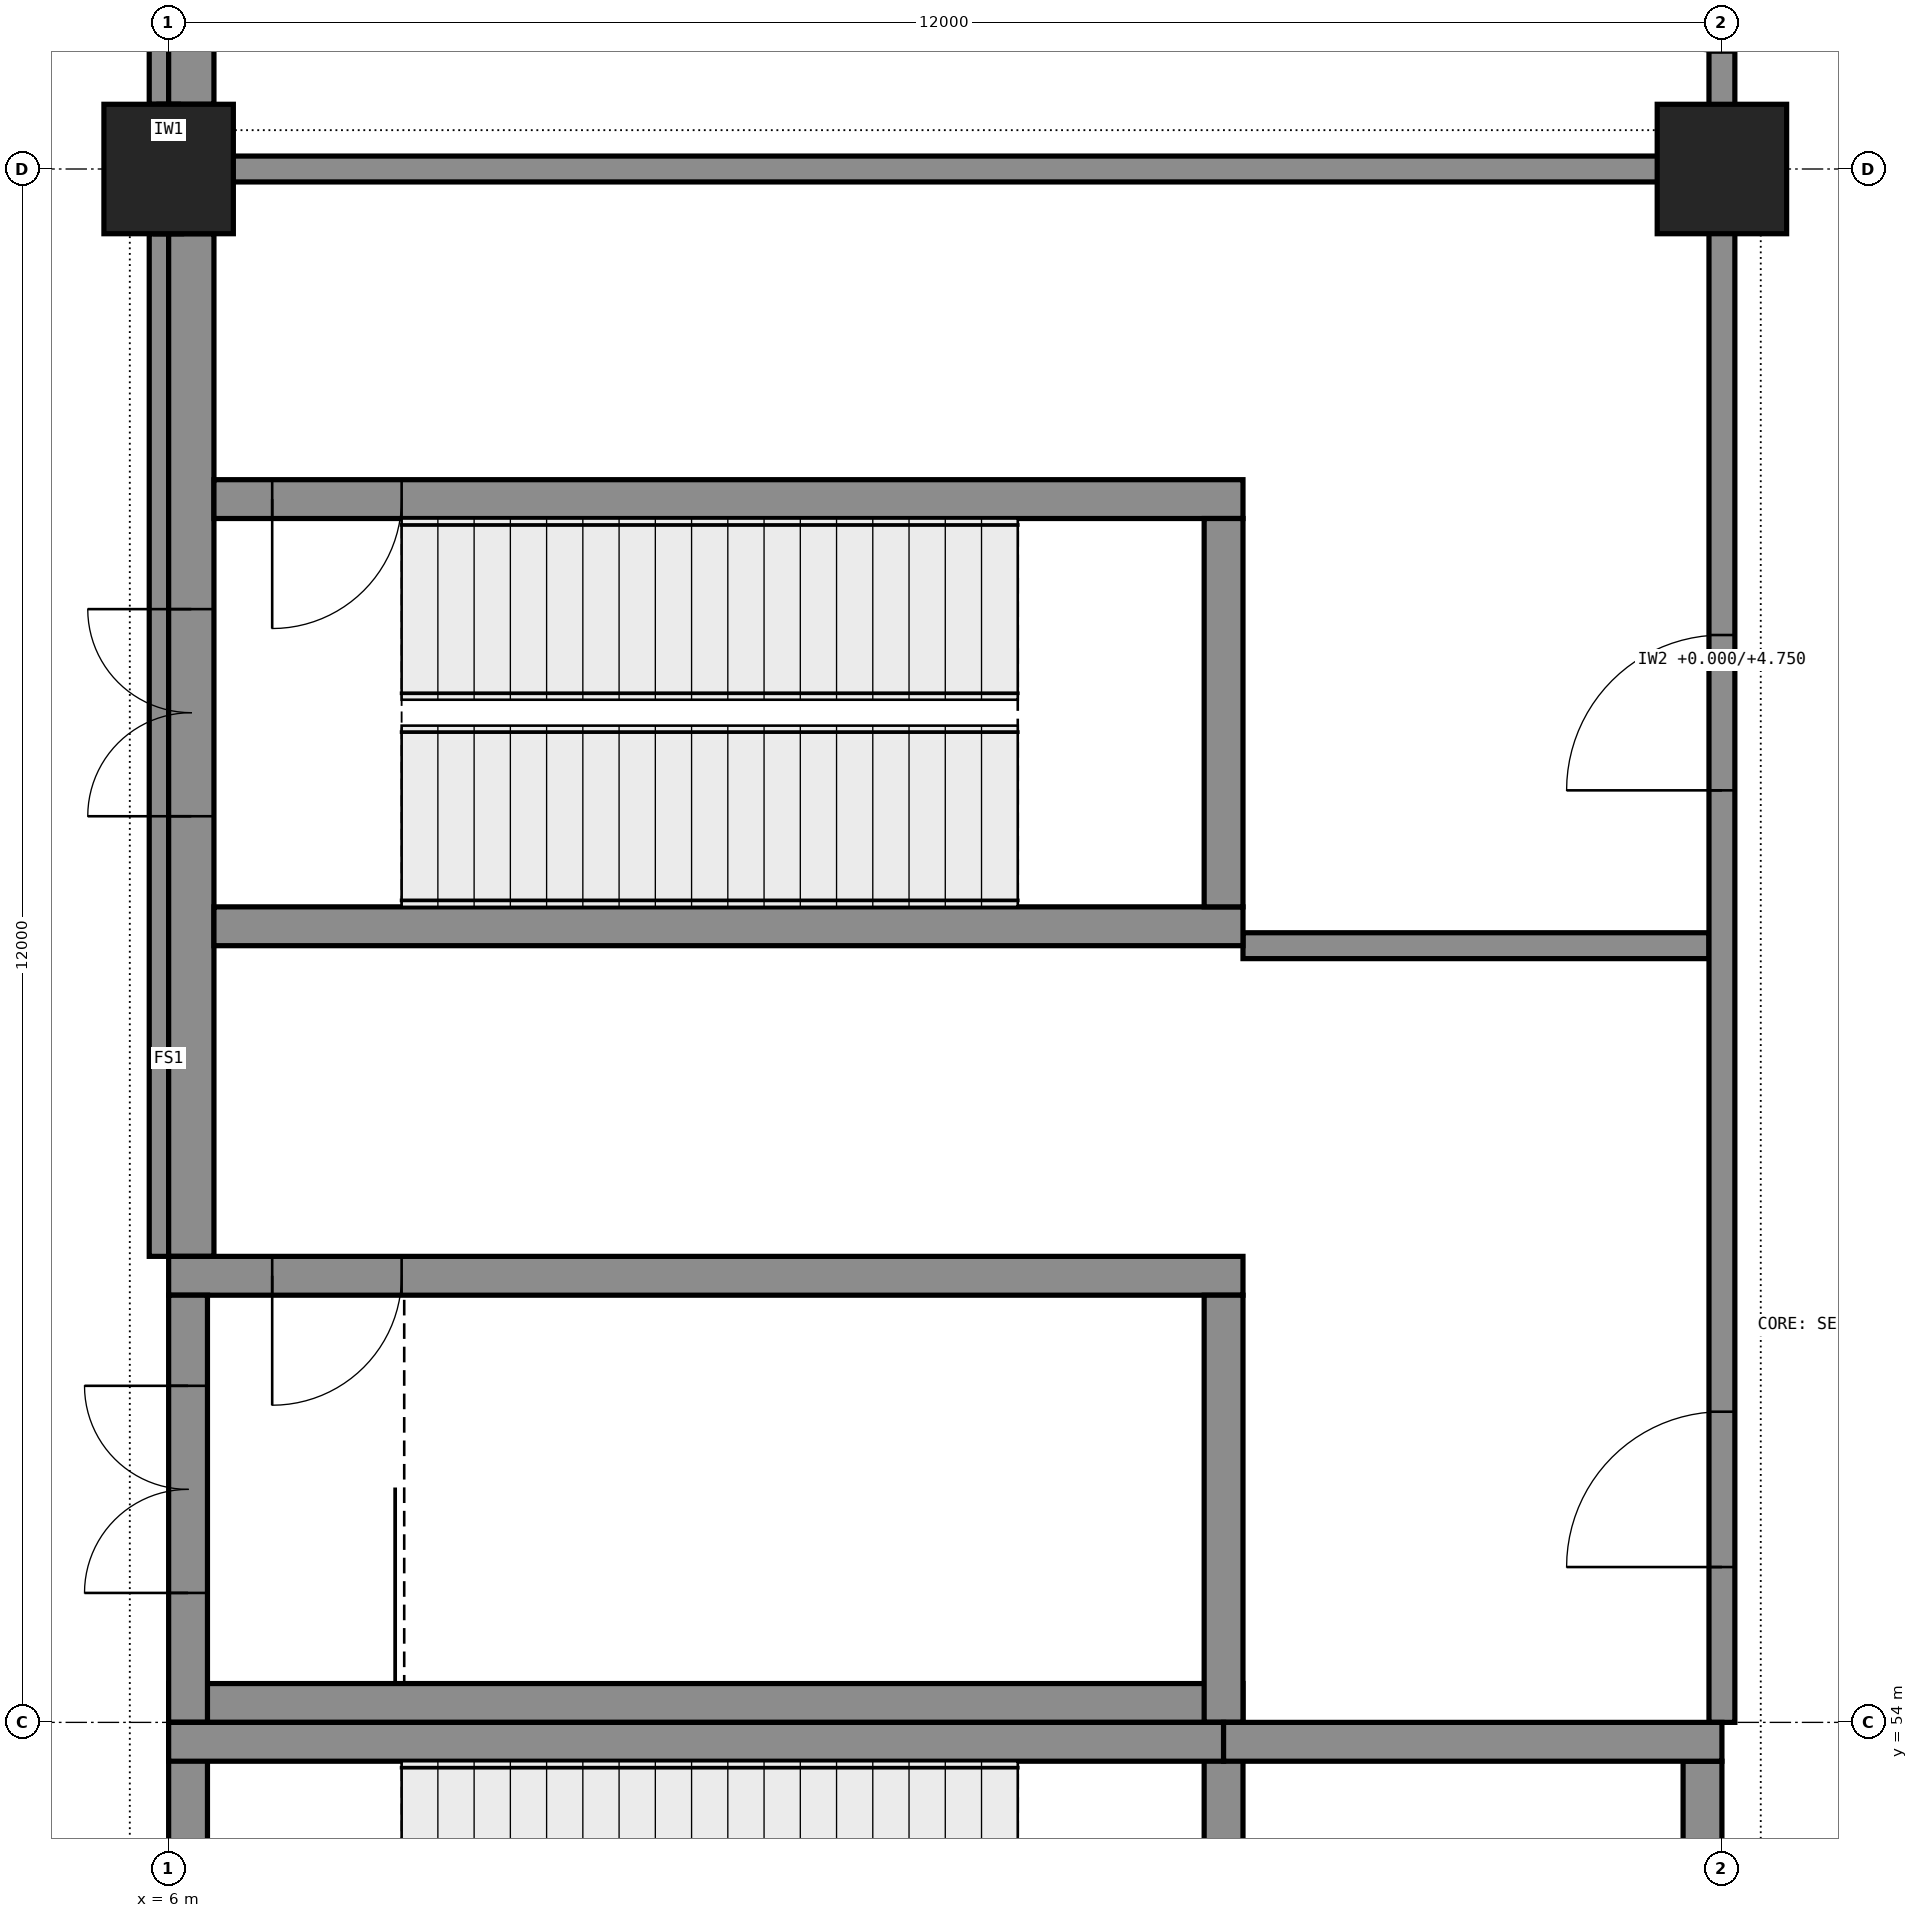
"""IFC4 building model, lengths in metres.
Left out: names, types, materials, properties, quantities, classifications, styles, units other than length and angle.
Written with IfcOpenShell. Run it as: python <this file> out.ifc"""

import sys

from ifc_helpers import new_model, si_unit, direction, frame, frame_2d, origin, origin_2d, place, context, subcontext, project, spatial, rectangle, extrude, element, fill, save


model = new_model("IFC4")
c1 = context("Model", 3, precision=1e-05, world=origin(), true_north=direction((0.0, 1.0)))
c2 = subcontext(c1, "Body", "Model", "MODEL_VIEW")
j1 = project(units=[si_unit("LENGTHUNIT", "METRE"), si_unit("PLANEANGLEUNIT", "RADIAN")], contexts=[c1])
p1 = place(None, origin())
s1 = spatial("IfcSite", under=j1, at=p1, CompositionType="ELEMENT")
p2 = place(p1, origin())
s2 = spatial("IfcBuilding", under=s1, at=p2, CompositionType="ELEMENT")
p3 = place(p2, origin())
s3 = spatial("IfcBuildingStorey", under=s2, at=p3, CompositionType="ELEMENT", Elevation=0.0)
for number, where, z_axis, x_axis in (
    (1, (6.0, 66.0, 0.0), (0.0, 0.0, 1.0), (1.0, 0.0, 0.0)),
    (2, (18.0, 66.0, 0.0), (0.0, 0.0, 1.0), (1.0, 0.0, 0.0)),
):
    element("IfcColumn", number, at=place(p3, frame(where, z_axis=z_axis, x_axis=x_axis)), inside=s3, PredefinedType="COLUMN", context=c2, shape_type="SweptSolid", body=[
        extrude(rectangle(XDim=1.0, YDim=1.0, at=origin_2d()), origin(), (0.0, 0.0, 1.0), 6.0),
    ])
p4 = place(p3, frame((6.0, 54.15, 0.0), z_axis=(0.0, 0.0, 1.0), x_axis=(1.0, 0.0, 0.0)))
e3 = element("IfcWall", 3, at=p4, inside=s3, PredefinedType="SHEAR", context=c2, shape_type="SweptSolid", body=[
    extrude(rectangle(XDim=8.3, YDim=0.3, at=frame_2d((4.15, 0.0))), origin(), (0.0, 0.0, 1.0), 5.75),
])
p5 = place(p3, frame((6.0, 57.45, 0.0), z_axis=(0.0, 0.0, 1.0), x_axis=(1.0, 0.0, 0.0)))
e4 = element("IfcWall", 4, at=p5, inside=s3, PredefinedType="SHEAR", context=c2, shape_type="SweptSolid", body=[
    extrude(rectangle(XDim=8.3, YDim=0.3, at=frame_2d((4.15, 0.0))), origin(), (0.0, 0.0, 1.0), 5.75),
])
p6 = place(p5, frame((0.8, 0.0, 0.0)))
e5 = element("IfcOpeningElement", 5, at=p6, cuts=e4, PredefinedType="OPENING", context=c2, shape_type="SweptSolid", body=[
    extrude(rectangle(XDim=1.0, YDim=2.1, at=frame_2d((0.5, 1.05))), frame((0.0, 0.16, 0.0), z_axis=(0.0, -1.0, 0.0), x_axis=(1.0, 0.0, 0.0)), (0.0, 0.0, 1.0), 0.32),
])
p7 = place(p3, frame((6.15, 54.0, 0.0), z_axis=(0.0, 0.0, 1.0), x_axis=(0.0, 1.0, 0.0)))
e6 = element("IfcWall", 6, at=p7, inside=s3, PredefinedType="SHEAR", context=c2, shape_type="SweptSolid", body=[
    extrude(rectangle(XDim=3.3, YDim=0.3, at=frame_2d((1.65, 0.0))), origin(), (0.0, 0.0, 1.0), 5.75),
])
p8 = place(p7, frame((1.0, 0.0, 0.0)))
e7 = element("IfcOpeningElement", 7, at=p8, cuts=e6, PredefinedType="OPENING", context=c2, shape_type="SweptSolid", body=[
    extrude(rectangle(XDim=1.6, YDim=2.1, at=frame_2d((0.8, 1.05))), frame((0.0, 0.16, 0.0), z_axis=(0.0, -1.0, 0.0), x_axis=(1.0, 0.0, 0.0)), (0.0, 0.0, 1.0), 0.32),
])
p9 = place(p3, frame((14.15, 54.0, 0.0), z_axis=(0.0, 0.0, 1.0), x_axis=(0.0, 1.0, 0.0)))
e8 = element("IfcWall", 8, at=p9, inside=s3, PredefinedType="SHEAR", context=c2, shape_type="SweptSolid", body=[
    extrude(rectangle(XDim=3.3, YDim=0.3, at=frame_2d((1.65, 0.0))), origin(), (0.0, 0.0, 1.0), 5.75),
])
p10 = place(p3, frame((6.35, 60.15, 0.0), z_axis=(0.0, 0.0, 1.0), x_axis=(1.0, 0.0, 0.0)))
e9 = element("IfcWall", 9, at=p10, inside=s3, PredefinedType="SHEAR", context=c2, shape_type="SweptSolid", body=[
    extrude(rectangle(XDim=7.95, YDim=0.3, at=frame_2d((3.975, 0.0))), origin(), (0.0, 0.0, 1.0), 5.75),
])
p11 = place(p3, frame((6.35, 63.45, 0.0), z_axis=(0.0, 0.0, 1.0), x_axis=(1.0, 0.0, 0.0)))
e10 = element("IfcWall", 10, at=p11, inside=s3, PredefinedType="SHEAR", context=c2, shape_type="SweptSolid", body=[
    extrude(rectangle(XDim=7.95, YDim=0.3, at=frame_2d((3.975, 0.0))), origin(), (0.0, 0.0, 1.0), 5.75),
])
p12 = place(p11, frame((0.45, 0.0, 0.0)))
e11 = element("IfcOpeningElement", 11, at=p12, cuts=e10, PredefinedType="OPENING", context=c2, shape_type="SweptSolid", body=[
    extrude(rectangle(XDim=1.0, YDim=2.1, at=frame_2d((0.5, 1.05))), frame((0.0, 0.16, 0.0), z_axis=(0.0, -1.0, 0.0), x_axis=(1.0, 0.0, 0.0)), (0.0, 0.0, 1.0), 0.32),
])
p13 = place(p3, frame((14.15, 60.3, 0.0), z_axis=(0.0, 0.0, 1.0), x_axis=(0.0, 1.0, 0.0)))
e12 = element("IfcWall", 12, at=p13, inside=s3, PredefinedType="SHEAR", context=c2, shape_type="SweptSolid", body=[
    extrude(rectangle(XDim=3.0, YDim=0.3, at=frame_2d((1.5, 0.0))), origin(), (0.0, 0.0, 1.0), 5.75),
])
p14 = place(p3, frame((6.0, 53.85, 0.0), z_axis=(0.0, 0.0, 1.0), x_axis=(1.0, 0.0, 0.0)))
e13 = element("IfcWall", 13, at=p14, inside=s3, PredefinedType="SHEAR", context=c2, shape_type="SweptSolid", body=[
    extrude(rectangle(XDim=8.15, YDim=0.3, at=frame_2d((4.075, 0.0))), origin(), (0.0, 0.0, 1.0), 5.75),
])
p15 = place(p3, frame((14.15, 53.85, 0.0), z_axis=(0.0, 0.0, 1.0), x_axis=(1.0, 0.0, 0.0)))
e14 = element("IfcWall", 14, at=p15, inside=s3, PredefinedType="SHEAR", context=c2, shape_type="SweptSolid", body=[
    extrude(rectangle(XDim=3.85, YDim=0.3, at=frame_2d((1.925, 0.0))), origin(), (0.0, 0.0, 1.0), 5.75),
])
p16 = place(p3, frame((6.15, 50.55, 0.0), z_axis=(0.0, 0.0, 1.0), x_axis=(0.0, 1.0, 0.0)))
e15 = element("IfcWall", 15, at=p16, inside=s3, PredefinedType="SHEAR", context=c2, shape_type="SweptSolid", body=[
    extrude(rectangle(XDim=3.45, YDim=0.3, at=frame_2d((1.725, 0.0))), origin(), (0.0, 0.0, 1.0), 5.75),
])
p17 = place(p16, frame((0.85, 0.0, 0.0)))
e16 = element("IfcOpeningElement", 16, at=p17, cuts=e15, PredefinedType="OPENING", context=c2, shape_type="SweptSolid", body=[
    extrude(rectangle(XDim=1.6, YDim=2.1, at=frame_2d((0.8, 1.05))), frame((0.0, 0.16, 0.0), z_axis=(0.0, -1.0, 0.0), x_axis=(1.0, 0.0, 0.0)), (0.0, 0.0, 1.0), 0.32),
])
p18 = place(p3, frame((17.85, 50.55, 0.0), z_axis=(0.0, 0.0, 1.0), x_axis=(0.0, 1.0, 0.0)))
e17 = element("IfcWall", 17, at=p18, inside=s3, PredefinedType="SHEAR", context=c2, shape_type="SweptSolid", body=[
    extrude(rectangle(XDim=3.15, YDim=0.3, at=frame_2d((1.575, 0.0))), origin(), (0.0, 0.0, 1.0), 5.75),
])
p19 = place(p18, frame((1.15, 0.0, 0.0)))
e18 = element("IfcOpeningElement", 18, at=p19, cuts=e17, PredefinedType="OPENING", context=c2, shape_type="SweptSolid", body=[
    extrude(rectangle(XDim=1.0, YDim=2.1, at=frame_2d((0.5, 1.05))), frame((0.0, 0.16, 0.0), z_axis=(0.0, -1.0, 0.0), x_axis=(1.0, 0.0, 0.0)), (0.0, 0.0, 1.0), 0.32),
])
p20 = place(p3, frame((14.15, 50.7, 0.0), z_axis=(0.0, 0.0, 1.0), x_axis=(0.0, 1.0, 0.0)))
e19 = element("IfcWall", 19, at=p20, inside=s3, PredefinedType="SHEAR", context=c2, shape_type="SweptSolid", body=[
    extrude(rectangle(XDim=3.3, YDim=0.3, at=frame_2d((1.65, 0.0))), origin(), (0.0, 0.0, 1.0), 5.75),
])
p21 = place(p3, frame((6.175, 77.5, 0.0), z_axis=(0.0, 0.0, 1.0), x_axis=(0.0, -1.0, 0.0)))
e20 = element("IfcWall", 20, at=p21, inside=s3, PredefinedType="STANDARD", context=c2, shape_type="SweptSolid", body=[
    extrude(rectangle(XDim=11.0, YDim=0.35, at=frame_2d((5.5, 0.0))), origin(), (0.0, 0.0, 1.0), 4.75),
])
p22 = place(p21, frame((8.1, 0.0, 0.45)))
e21 = element("IfcOpeningElement", 21, at=p22, cuts=e20, PredefinedType="OPENING", context=c2, shape_type="SweptSolid", body=[
    extrude(rectangle(XDim=2.4, YDim=3.0, at=frame_2d((1.2, 1.5))), frame((0.0, 0.185, 0.0), z_axis=(0.0, -1.0, 0.0), x_axis=(1.0, 0.0, 0.0)), (0.0, 0.0, 1.0), 0.37),
])
p23 = place(p21, frame((3.1, 0.0, 0.0)))
e22 = element("IfcOpeningElement", 22, at=p23, cuts=e20, PredefinedType="OPENING", context=c2, shape_type="SweptSolid", body=[
    extrude(rectangle(XDim=4.8, YDim=2.4, at=frame_2d((2.4, 1.2))), frame((0.0, 0.185, 0.0), z_axis=(0.0, -1.0, 0.0), x_axis=(1.0, 0.0, 0.0)), (0.0, 0.0, 1.0), 0.37),
])
p24 = place(p3, frame((5.925, 77.5, 5.75), z_axis=(0.0, 0.0, 1.0), x_axis=(0.0, -1.0, 0.0)))
e23 = element("IfcWall", 23, at=p24, inside=s3, PredefinedType="STANDARD", context=c2, shape_type="SweptSolid", body=[
    extrude(rectangle(XDim=11.0, YDim=0.15, at=frame_2d((5.5, 0.0))), origin(), (0.0, 0.0, 1.0), 0.25),
])
p25 = place(p3, frame((6.175, 65.5, 0.0), z_axis=(0.0, 0.0, 1.0), x_axis=(0.0, -1.0, 0.0)))
e24 = element("IfcWall", 24, at=p25, inside=s3, PredefinedType="STANDARD", context=c2, shape_type="SweptSolid", body=[
    extrude(rectangle(XDim=7.9, YDim=0.35, at=frame_2d((3.95, 0.0))), origin(), (0.0, 0.0, 1.0), 4.75),
])
p26 = place(p25, frame((2.9, 0.0, 0.0)))
e25 = element("IfcOpeningElement", 25, at=p26, cuts=e24, PredefinedType="OPENING", context=c2, shape_type="SweptSolid", body=[
    extrude(rectangle(XDim=1.6, YDim=2.1, at=frame_2d((0.8, 1.05))), frame((0.0, 0.185, 0.0), z_axis=(0.0, -1.0, 0.0), x_axis=(1.0, 0.0, 0.0)), (0.0, 0.0, 1.0), 0.37),
])
p27 = place(p3, frame((5.925, 65.5, 5.75), z_axis=(0.0, 0.0, 1.0), x_axis=(0.0, -1.0, 0.0)))
e26 = element("IfcWall", 26, at=p27, inside=s3, PredefinedType="STANDARD", context=c2, shape_type="SweptSolid", body=[
    extrude(rectangle(XDim=7.9, YDim=0.15, at=frame_2d((3.95, 0.0))), origin(), (0.0, 0.0, 1.0), 0.25),
])
p28 = place(p3, frame((14.3, 60.0, 0.0), z_axis=(0.0, 0.0, 1.0), x_axis=(1.0, 0.0, 0.0)))
e27 = element("IfcWall", 27, at=p28, inside=s3, PredefinedType="PARTITIONING", context=c2, shape_type="SweptSolid", body=[
    extrude(rectangle(XDim=3.6, YDim=0.2, at=frame_2d((1.8, 0.0))), origin(), (0.0, 0.0, 1.0), 5.75),
])
p29 = place(p3, frame((5.925, 66.0, 0.0), z_axis=(0.0, 0.0, 1.0), x_axis=(1.0, 0.0, 0.0)))
e28 = element("IfcWall", 28, at=p29, inside=s3, PredefinedType="PARTITIONING", context=c2, shape_type="SweptSolid", body=[
    extrude(rectangle(XDim=11.975, YDim=0.2, at=frame_2d((5.987, 0.0))), origin(), (0.0, 0.0, 1.0), 4.75),
])
p30 = place(p3, frame((6.0, 65.5, 0.0), z_axis=(0.0, 0.0, 1.0), x_axis=(0.0, 1.0, 0.0)))
e29 = element("IfcWall", 29, at=p30, inside=s3, PredefinedType="PARTITIONING", context=c2, shape_type="SweptSolid", body=[
    extrude(rectangle(XDim=0.4, YDim=0.2, at=frame_2d((0.2, 0.0))), origin(), (0.0, 0.0, 1.0), 5.75),
])
p31 = place(p3, frame((6.0, 66.1, 0.0), z_axis=(0.0, 0.0, 1.0), x_axis=(0.0, 1.0, 0.0)))
e30 = element("IfcWall", 30, at=p31, inside=s3, PredefinedType="PARTITIONING", context=c2, shape_type="SweptSolid", body=[
    extrude(rectangle(XDim=0.4, YDim=0.15, at=frame_2d((0.2, 0.0))), origin(), (0.0, 0.0, 1.0), 5.75),
])
p32 = place(p3, frame((18.0, 54.0, 0.0), z_axis=(0.0, 0.0, 1.0), x_axis=(0.0, 1.0, 0.0)))
e31 = element("IfcWall", 31, at=p32, inside=s3, PredefinedType="PARTITIONING", context=c2, shape_type="SweptSolid", body=[
    extrude(rectangle(XDim=36.0, YDim=0.2, at=frame_2d((18.0, 0.0))), origin(), (0.0, 0.0, 1.0), 4.75),
])
p33 = place(p32, frame((1.2, 0.0, 0.0)))
e32 = element("IfcOpeningElement", 32, at=p33, cuts=e31, PredefinedType="OPENING", context=c2, shape_type="SweptSolid", body=[
    extrude(rectangle(XDim=1.2, YDim=2.1, at=frame_2d((0.6, 1.05))), frame((0.0, 0.11, 0.0), z_axis=(0.0, -1.0, 0.0), x_axis=(1.0, 0.0, 0.0)), (0.0, 0.0, 1.0), 0.22),
])
p34 = place(p32, frame((7.2, 0.0, 0.0)))
e33 = element("IfcOpeningElement", 33, at=p34, cuts=e31, PredefinedType="OPENING", context=c2, shape_type="SweptSolid", body=[
    extrude(rectangle(XDim=1.2, YDim=2.1, at=frame_2d((0.6, 1.05))), frame((0.0, 0.11, 0.0), z_axis=(0.0, -1.0, 0.0), x_axis=(1.0, 0.0, 0.0)), (0.0, 0.0, 1.0), 0.22),
])
p35 = place(p32, frame((12.9, 0.0, 0.0)))
e34 = element("IfcOpeningElement", 34, at=p35, cuts=e31, PredefinedType="OPENING", context=c2, shape_type="SweptSolid", body=[
    extrude(rectangle(XDim=1.2, YDim=2.1, at=frame_2d((0.6, 1.05))), frame((0.0, 0.11, 0.0), z_axis=(0.0, -1.0, 0.0), x_axis=(1.0, 0.0, 0.0)), (0.0, 0.0, 1.0), 0.22),
])
p36 = place(p32, frame((17.4, 0.0, 0.0)))
e35 = element("IfcOpeningElement", 35, at=p36, cuts=e31, PredefinedType="OPENING", context=c2, shape_type="SweptSolid", body=[
    extrude(rectangle(XDim=1.2, YDim=2.1, at=frame_2d((0.6, 1.05))), frame((0.0, 0.11, 0.0), z_axis=(0.0, -1.0, 0.0), x_axis=(1.0, 0.0, 0.0)), (0.0, 0.0, 1.0), 0.22),
])
p37 = place(p32, frame((24.9, 0.0, 0.0)))
e36 = element("IfcOpeningElement", 36, at=p37, cuts=e31, PredefinedType="OPENING", context=c2, shape_type="SweptSolid", body=[
    extrude(rectangle(XDim=1.2, YDim=2.1, at=frame_2d((0.6, 1.05))), frame((0.0, 0.11, 0.0), z_axis=(0.0, -1.0, 0.0), x_axis=(1.0, 0.0, 0.0)), (0.0, 0.0, 1.0), 0.22),
])
p38 = place(p32, frame((30.9, 0.0, 0.0)))
e37 = element("IfcOpeningElement", 37, at=p38, cuts=e31, PredefinedType="OPENING", context=c2, shape_type="SweptSolid", body=[
    extrude(rectangle(XDim=1.2, YDim=2.1, at=frame_2d((0.6, 1.05))), frame((0.0, 0.11, 0.0), z_axis=(0.0, -1.0, 0.0), x_axis=(1.0, 0.0, 0.0)), (0.0, 0.0, 1.0), 0.22),
])
p39 = place(p8, origin())
e38 = element("IfcDoor", 38, at=p39, inside=s3, OperationType="DOUBLE_DOOR_SINGLE_SWING", PredefinedType="DOOR", context=c2, shape_type="SweptSolid", body=[
    extrude(rectangle(XDim=1.6, YDim=2.1, at=frame_2d((0.8, 1.05))), frame((0.0, 0.025, 0.0), z_axis=(0.0, -1.0, 0.0), x_axis=(1.0, 0.0, 0.0)), (0.0, 0.0, 1.0), 0.05),
])
fill(e7, e38)
p40 = place(p33, origin())
e39 = element("IfcDoor", 39, at=p40, inside=s3, OperationType="SINGLE_SWING_RIGHT", PredefinedType="DOOR", context=c2, shape_type="SweptSolid", body=[
    extrude(rectangle(XDim=1.2, YDim=2.1, at=frame_2d((0.6, 1.05))), frame((0.0, 0.025, 0.0), z_axis=(0.0, -1.0, 0.0), x_axis=(1.0, 0.0, 0.0)), (0.0, 0.0, 1.0), 0.05),
])
fill(e32, e39)
p41 = place(p6, frame((1.0, 0.0, 0.0), z_axis=(0.0, 0.0, 1.0), x_axis=(-1.0, 0.0, 0.0)))
e40 = element("IfcDoor", 40, at=p41, inside=s3, OperationType="SINGLE_SWING_LEFT", PredefinedType="DOOR", context=c2, shape_type="SweptSolid", body=[
    extrude(rectangle(XDim=1.0, YDim=2.1, at=frame_2d((0.5, 1.05))), frame((0.0, 0.025, 0.0), z_axis=(0.0, -1.0, 0.0), x_axis=(1.0, 0.0, 0.0)), (0.0, 0.0, 1.0), 0.05),
])
fill(e5, e40)
p42 = place(p26, frame((1.6, 0.0, 0.0), z_axis=(0.0, 0.0, 1.0), x_axis=(-1.0, 0.0, 0.0)))
e41 = element("IfcDoor", 41, at=p42, inside=s3, OperationType="DOUBLE_DOOR_SINGLE_SWING", PredefinedType="DOOR", context=c2, shape_type="SweptSolid", body=[
    extrude(rectangle(XDim=1.6, YDim=2.1, at=frame_2d((0.8, 1.05))), frame((0.0, 0.025, 0.0), z_axis=(0.0, -1.0, 0.0), x_axis=(1.0, 0.0, 0.0)), (0.0, 0.0, 1.0), 0.05),
])
fill(e25, e41)
p43 = place(p34, origin())
e42 = element("IfcDoor", 42, at=p43, inside=s3, OperationType="SINGLE_SWING_RIGHT", PredefinedType="DOOR", context=c2, shape_type="SweptSolid", body=[
    extrude(rectangle(XDim=1.2, YDim=2.1, at=frame_2d((0.6, 1.05))), frame((0.0, 0.025, 0.0), z_axis=(0.0, -1.0, 0.0), x_axis=(1.0, 0.0, 0.0)), (0.0, 0.0, 1.0), 0.05),
])
fill(e33, e42)
p44 = place(p12, frame((1.0, 0.0, 0.0), z_axis=(0.0, 0.0, 1.0), x_axis=(-1.0, 0.0, 0.0)))
e43 = element("IfcDoor", 43, at=p44, inside=s3, OperationType="SINGLE_SWING_LEFT", PredefinedType="DOOR", context=c2, shape_type="SweptSolid", body=[
    extrude(rectangle(XDim=1.0, YDim=2.1, at=frame_2d((0.5, 1.05))), frame((0.0, 0.025, 0.0), z_axis=(0.0, -1.0, 0.0), x_axis=(1.0, 0.0, 0.0)), (0.0, 0.0, 1.0), 0.05),
])
fill(e11, e43)
save(model, sys.argv[1])
